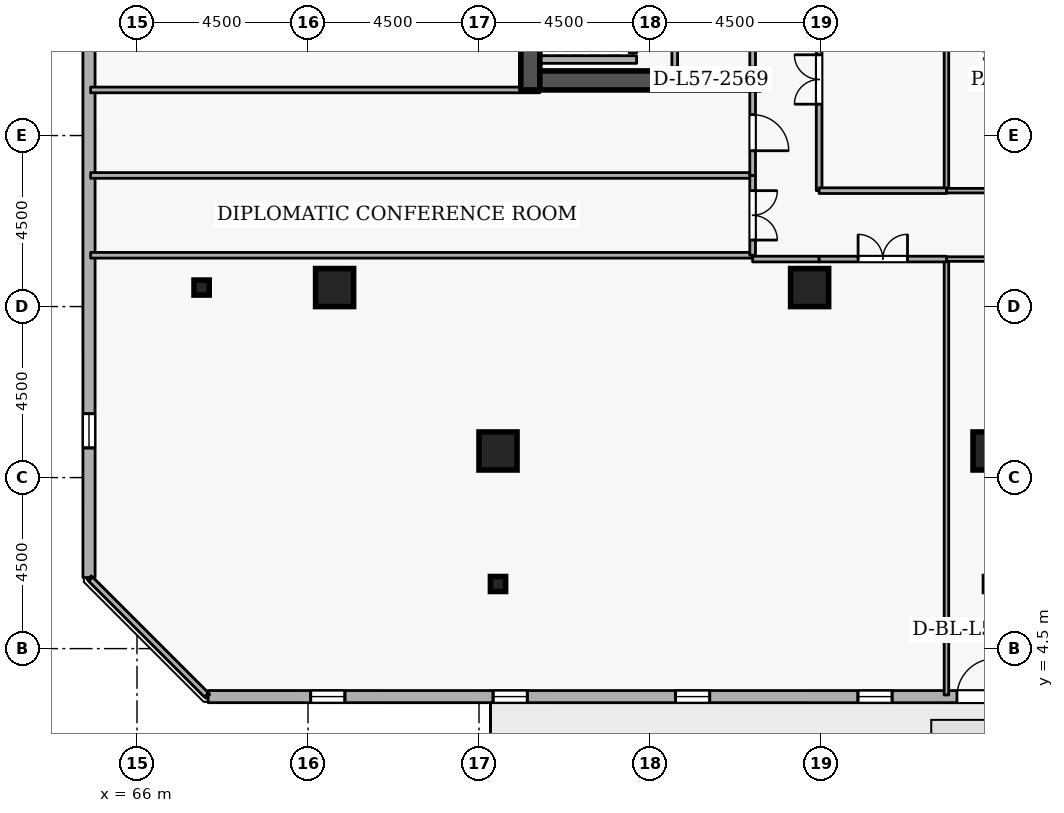
"""IFC4 building model, lengths in metres.
Left out: names, types, materials, properties, quantities, classifications, styles, units other than length and angle.
Written with IfcOpenShell. Run it as: python <this file> out.ifc"""

import sys

from ifc_helpers import new_model, si_unit, direction, frame, frame_2d, origin, origin_2d, place, context, subcontext, project, spatial, rectangle, i_section, extrude, element, fill, save


model = new_model("IFC4")
c1 = context("Model", 3, precision=1e-05, world=origin(), true_north=direction((0.0, 1.0)))
c2 = subcontext(c1, "Body", "Model", "MODEL_VIEW")
j1 = project(units=[si_unit("LENGTHUNIT", "METRE"), si_unit("PLANEANGLEUNIT", "RADIAN")], contexts=[c1])
p1 = place(None, origin())
s1 = spatial("IfcSite", under=j1, at=p1, CompositionType="ELEMENT")
p2 = place(p1, origin())
s2 = spatial("IfcBuilding", under=s1, at=p2, CompositionType="ELEMENT")
p3 = place(p2, frame((0.0, 0.0, 214.5)))
s3 = spatial("IfcBuildingStorey", under=s2, at=p3, CompositionType="ELEMENT", Elevation=214.5)
p4 = place(p3, frame((76.35, 19.2, 0.0), z_axis=(0.0, 0.0, 1.0), x_axis=(0.0, 1.0, 0.0)))
e1 = element("IfcWall", 1, at=p4, inside=s3, PredefinedType="SHEAR", context=c2, shape_type="SweptSolid", body=[
    extrude(rectangle(XDim=15.6, YDim=0.5, at=frame_2d((7.8, 0.0))), origin(), (0.0, 0.0, 1.0), 3.6),
])
p5 = place(p3, frame((76.6, 19.45, 0.0), z_axis=(0.0, 0.0, 1.0), x_axis=(1.0, 0.0, 0.0)))
e2 = element("IfcWall", 2, at=p5, inside=s3, PredefinedType="SHEAR", context=c2, shape_type="SweptSolid", body=[
    extrude(rectangle(XDim=5.8, YDim=0.5, at=frame_2d((2.9, 0.0))), origin(), (0.0, 0.0, 1.0), 3.6),
])
for number, where, z_axis, x_axis in (
    (3, (71.2, 14.0, 0.0), (0.0, 0.0, 1.0), (1.0, 0.0, 0.0)),
    (4, (88.5, 9.7, 0.0), (0.0, 0.0, 1.0), (1.0, 0.0, 0.0)),
    (5, (75.5, 9.7, 0.0), (0.0, 0.0, 1.0), (1.0, 0.0, 0.0)),
    (6, (83.7, 14.0, 0.0), (0.0, 0.0, 1.0), (1.0, 0.0, 0.0)),
):
    element("IfcColumn", number, at=place(p3, frame(where, z_axis=z_axis, x_axis=x_axis)), inside=s3, PredefinedType="COLUMN", context=c2, shape_type="SweptSolid", body=[
        extrude(rectangle(XDim=1.0, YDim=1.0, at=origin_2d()), origin(), (0.0, 0.0, 1.0), 3.6),
    ])
for number, where, z_axis, x_axis in (
    (7, (67.7, 14.0, 0.0), (0.0, 0.0, 1.0), (1.0, 0.0, 0.0)),
    (8, (75.5, 6.2, 0.0), (0.0, 0.0, 1.0), (1.0, 0.0, 0.0)),
):
    element("IfcColumn", number, at=place(p3, frame(where, z_axis=z_axis, x_axis=x_axis)), inside=s3, PredefinedType="COLUMN", context=c2, shape_type="SweptSolid", body=[
        extrude(i_section(OverallWidth=0.399, OverallDepth=0.394, WebThickness=0.023, FlangeThickness=0.037, FilletRadius=0.015, at=origin_2d()), origin(), (0.0, 0.0, 1.0), 3.6),
    ])
p6 = place(p3, frame((67.871, 3.237, 0.0), z_axis=(0.0, 0.0, 1.0), x_axis=(0.999999998513, -5.4540124e-05, 0.0)))
e9 = element("IfcWall", 9, at=p6, inside=s3, PredefinedType="STANDARD", context=c2, shape_type="SweptSolid", body=[
    extrude(rectangle(XDim=35.811, YDim=0.32, at=frame_2d((17.905, 0.0))), origin(), (0.0, 0.0, 1.0), 2.7),
])
p7 = place(p6, frame((19.706, 0.0, 0.0)))
e10 = element("IfcOpeningElement", 10, at=p7, cuts=e9, PredefinedType="OPENING", context=c2, shape_type="SweptSolid", body=[
    extrude(rectangle(XDim=1.0, YDim=2.08, at=frame_2d((0.5, 1.04))), frame((0.0, 0.17, 0.0), z_axis=(0.0, -1.0, 0.0), x_axis=(1.0, 0.0, 0.0)), (0.0, 0.0, 1.0), 0.34),
])
p8 = place(p6, frame((2.7, 0.0, 0.72)))
e11 = element("IfcOpeningElement", 11, at=p8, cuts=e9, PredefinedType="OPENING", context=c2, shape_type="SweptSolid", body=[
    extrude(rectangle(XDim=0.9, YDim=1.75, at=frame_2d((0.45, 0.875))), frame((0.0, 0.17, 0.0), z_axis=(0.0, -1.0, 0.0), x_axis=(1.0, 0.0, 0.0)), (0.0, 0.0, 1.0), 0.34),
])
p9 = place(p6, frame((7.5, 0.0, 0.72)))
e12 = element("IfcOpeningElement", 12, at=p9, cuts=e9, PredefinedType="OPENING", context=c2, shape_type="SweptSolid", body=[
    extrude(rectangle(XDim=0.9, YDim=1.75, at=frame_2d((0.45, 0.875))), frame((0.0, 0.17, 0.0), z_axis=(0.0, -1.0, 0.0), x_axis=(1.0, 0.0, 0.0)), (0.0, 0.0, 1.0), 0.34),
])
p10 = place(p6, frame((12.3, 0.0, 0.72)))
e13 = element("IfcOpeningElement", 13, at=p10, cuts=e9, PredefinedType="OPENING", context=c2, shape_type="SweptSolid", body=[
    extrude(rectangle(XDim=0.9, YDim=1.75, at=frame_2d((0.45, 0.875))), frame((0.0, 0.17, 0.0), z_axis=(0.0, -1.0, 0.0), x_axis=(1.0, 0.0, 0.0)), (0.0, 0.0, 1.0), 0.34),
])
p11 = place(p6, frame((17.1, 0.0, 0.72)))
e14 = element("IfcOpeningElement", 14, at=p11, cuts=e9, PredefinedType="OPENING", context=c2, shape_type="SweptSolid", body=[
    extrude(rectangle(XDim=0.9, YDim=1.75, at=frame_2d((0.45, 0.875))), frame((0.0, 0.17, 0.0), z_axis=(0.0, -1.0, 0.0), x_axis=(1.0, 0.0, 0.0)), (0.0, 0.0, 1.0), 0.34),
])
p12 = place(p6, frame((21.9, 0.0, 0.72)))
e15 = element("IfcOpeningElement", 15, at=p12, cuts=e9, PredefinedType="OPENING", context=c2, shape_type="SweptSolid", body=[
    extrude(rectangle(XDim=0.9, YDim=1.75, at=frame_2d((0.45, 0.875))), frame((0.0, 0.17, 0.0), z_axis=(0.0, -1.0, 0.0), x_axis=(1.0, 0.0, 0.0)), (0.0, 0.0, 1.0), 0.34),
])
p13 = place(p6, frame((26.7, 0.0, 0.72)))
e16 = element("IfcOpeningElement", 16, at=p13, cuts=e9, PredefinedType="OPENING", context=c2, shape_type="SweptSolid", body=[
    extrude(rectangle(XDim=0.9, YDim=1.75, at=frame_2d((0.45, 0.875))), frame((0.0, 0.17, 0.0), z_axis=(0.0, -1.0, 0.0), x_axis=(1.0, 0.0, 0.0)), (0.0, 0.0, 1.0), 0.34),
])
p14 = place(p6, frame((31.5, 0.0, 0.72)))
e17 = element("IfcOpeningElement", 17, at=p14, cuts=e9, PredefinedType="OPENING", context=c2, shape_type="SweptSolid", body=[
    extrude(rectangle(XDim=0.9, YDim=1.75, at=frame_2d((0.45, 0.875))), frame((0.0, 0.17, 0.0), z_axis=(0.0, -1.0, 0.0), x_axis=(1.0, 0.0, 0.0)), (0.0, 0.0, 1.0), 0.34),
])
p15 = place(p3, frame((64.735, 42.181, 0.0), z_axis=(0.0, 0.0, 1.0), x_axis=(5.4540124e-05, -0.999999998513, 0.0)))
e18 = element("IfcWall", 18, at=p15, inside=s3, PredefinedType="STANDARD", context=c2, shape_type="SweptSolid", body=[
    extrude(rectangle(XDim=35.811, YDim=0.32, at=frame_2d((17.905, 0.0))), origin(), (0.0, 0.0, 1.0), 2.7),
])
p16 = place(p15, frame((2.7, 0.0, 0.72)))
e19 = element("IfcOpeningElement", 19, at=p16, cuts=e18, PredefinedType="OPENING", context=c2, shape_type="SweptSolid", body=[
    extrude(rectangle(XDim=0.9, YDim=1.75, at=frame_2d((0.45, 0.875))), frame((0.0, 0.17, 0.0), z_axis=(0.0, -1.0, 0.0), x_axis=(1.0, 0.0, 0.0)), (0.0, 0.0, 1.0), 0.34),
])
p17 = place(p15, frame((7.5, 0.0, 0.72)))
e20 = element("IfcOpeningElement", 20, at=p17, cuts=e18, PredefinedType="OPENING", context=c2, shape_type="SweptSolid", body=[
    extrude(rectangle(XDim=0.9, YDim=1.75, at=frame_2d((0.45, 0.875))), frame((0.0, 0.17, 0.0), z_axis=(0.0, -1.0, 0.0), x_axis=(1.0, 0.0, 0.0)), (0.0, 0.0, 1.0), 0.34),
])
p18 = place(p15, frame((12.3, 0.0, 0.72)))
e21 = element("IfcOpeningElement", 21, at=p18, cuts=e18, PredefinedType="OPENING", context=c2, shape_type="SweptSolid", body=[
    extrude(rectangle(XDim=0.9, YDim=1.75, at=frame_2d((0.45, 0.875))), frame((0.0, 0.17, 0.0), z_axis=(0.0, -1.0, 0.0), x_axis=(1.0, 0.0, 0.0)), (0.0, 0.0, 1.0), 0.34),
])
p19 = place(p15, frame((17.1, 0.0, 0.72)))
e22 = element("IfcOpeningElement", 22, at=p19, cuts=e18, PredefinedType="OPENING", context=c2, shape_type="SweptSolid", body=[
    extrude(rectangle(XDim=0.9, YDim=1.75, at=frame_2d((0.45, 0.875))), frame((0.0, 0.17, 0.0), z_axis=(0.0, -1.0, 0.0), x_axis=(1.0, 0.0, 0.0)), (0.0, 0.0, 1.0), 0.34),
])
p20 = place(p15, frame((31.5, 0.0, 0.72)))
e23 = element("IfcOpeningElement", 23, at=p20, cuts=e18, PredefinedType="OPENING", context=c2, shape_type="SweptSolid", body=[
    extrude(rectangle(XDim=0.9, YDim=1.75, at=frame_2d((0.45, 0.875))), frame((0.0, 0.17, 0.0), z_axis=(0.0, -1.0, 0.0), x_axis=(1.0, 0.0, 0.0)), (0.0, 0.0, 1.0), 0.34),
])
p21 = place(p3, frame((79.05, 20.18, 0.0), z_axis=(0.0, 0.0, 1.0), x_axis=(0.0, 1.0, 0.0)))
e24 = element("IfcWall", 24, at=p21, inside=s3, PredefinedType="STANDARD", context=c2, shape_type="SweptSolid", body=[
    extrude(rectangle(XDim=1.94, YDim=0.2, at=frame_2d((0.97, 0.0))), origin(), (0.0, 0.0, 1.0), 3.34),
])
p22 = place(p21, frame((0.46, 0.0, 0.0)))
e25 = element("IfcOpeningElement", 25, at=p22, cuts=e24, PredefinedType="OPENING", context=c2, shape_type="SweptSolid", body=[
    extrude(rectangle(XDim=1.02, YDim=2.06, at=frame_2d((0.51, 1.03))), frame((0.0, 0.11, 0.0), z_axis=(0.0, -1.0, 0.0), x_axis=(1.0, 0.0, 0.0)), (0.0, 0.0, 1.0), 0.22),
])
p23 = place(p3, frame((76.612, 20.0, 0.0), z_axis=(0.0, 0.0, 1.0), x_axis=(1.0, 0.0, 0.0)))
e26 = element("IfcWall", 26, at=p23, inside=s3, PredefinedType="STANDARD", context=c2, shape_type="SweptSolid", body=[
    extrude(rectangle(XDim=2.536, YDim=0.2, at=frame_2d((1.268, 0.0))), origin(), (0.0, 0.0, 1.0), 3.34),
])
p24 = place(p3, frame((82.2, 19.8, 0.0), z_axis=(0.0, 0.0, 1.0), x_axis=(0.0, 1.0, 0.0)))
e27 = element("IfcWall", 27, at=p24, inside=s3, PredefinedType="PARTITIONING", context=c2, shape_type="SweptSolid", body=[
    extrude(rectangle(XDim=2.25, YDim=0.15, at=frame_2d((1.125, 0.0))), origin(), (0.0, 0.0, 1.0), 3.34),
])
p25 = place(p24, frame((0.665, 0.0, 0.0)))
e28 = element("IfcOpeningElement", 28, at=p25, cuts=e27, PredefinedType="OPENING", context=c2, shape_type="SweptSolid", body=[
    extrude(rectangle(XDim=0.92, YDim=2.08, at=frame_2d((0.46, 1.04))), frame((0.0, 0.085, 0.0), z_axis=(0.0, -1.0, 0.0), x_axis=(1.0, 0.0, 0.0)), (0.0, 0.0, 1.0), 0.17),
])
p26 = place(p3, frame((80.15, 22.05, 0.0), z_axis=(0.0, 0.0, 1.0), x_axis=(0.0, -1.0, 0.0)))
e29 = element("IfcWall", 29, at=p26, inside=s3, PredefinedType="PARTITIONING", context=c2, shape_type="SweptSolid", body=[
    extrude(rectangle(XDim=2.25, YDim=0.15, at=frame_2d((1.125, 0.0))), origin(), (0.0, 0.0, 1.0), 3.34),
])
for number, where, z_axis, x_axis in (
    (30, (82.2, 14.85, 0.0), (0.0, 0.0, 1.0), (-1.0, 0.0, 0.0)),
    (31, (64.78, 16.95, 0.0), (0.0, 0.0, 1.0), (1.0, 0.0, 0.0)),
):
    element("IfcWall", number, at=place(p3, frame(where, z_axis=z_axis, x_axis=x_axis)), inside=s3, PredefinedType="PARTITIONING", context=c2, shape_type="SweptSolid", body=[
        extrude(rectangle(XDim=17.42, YDim=0.15, at=frame_2d((8.71, 0.0))), origin(), (0.0, 0.0, 1.0), 3.34),
    ])
p27 = place(p3, frame((82.2, 16.95, 0.0), z_axis=(0.0, 0.0, 1.0), x_axis=(0.0, -1.0, 0.0)))
e32 = element("IfcWall", 32, at=p27, inside=s3, PredefinedType="PARTITIONING", context=c2, shape_type="SweptSolid", body=[
    extrude(rectangle(XDim=2.1, YDim=0.15, at=frame_2d((1.05, 0.0))), origin(), (0.0, 0.0, 1.0), 3.34),
])
p28 = place(p27, frame((0.4, 0.0, 0.0)))
e33 = element("IfcOpeningElement", 33, at=p28, cuts=e32, PredefinedType="OPENING", context=c2, shape_type="SweptSolid", body=[
    extrude(rectangle(XDim=1.3, YDim=2.12, at=frame_2d((0.65, 1.06))), frame((0.0, 0.085, 0.0), z_axis=(0.0, -1.0, 0.0), x_axis=(1.0, 0.0, 0.0)), (0.0, 0.0, 1.0), 0.17),
])
p29 = place(p3, frame((64.78, 19.2, 0.0), z_axis=(0.0, 0.0, 1.0), x_axis=(1.0, 0.0, 0.0)))
e34 = element("IfcWall", 34, at=p29, inside=s3, PredefinedType="PARTITIONING", context=c2, shape_type="SweptSolid", body=[
    extrude(rectangle(XDim=11.82, YDim=0.15, at=frame_2d((5.91, 0.0))), origin(), (0.0, 0.0, 1.0), 2.545),
])
p30 = place(p3, frame((82.2, 19.2, 0.0), z_axis=(0.0, 0.0, 1.0), x_axis=(0.0, -1.0, 0.0)))
e35 = element("IfcWall", 35, at=p30, inside=s3, PredefinedType="PARTITIONING", context=c2, shape_type="SweptSolid", body=[
    extrude(rectangle(XDim=2.25, YDim=0.15, at=frame_2d((1.125, 0.0))), origin(), (0.0, 0.0, 1.0), 3.34),
])
p31 = place(p30, frame((0.65, 0.0, 0.0)))
e36 = element("IfcOpeningElement", 36, at=p31, cuts=e35, PredefinedType="OPENING", context=c2, shape_type="SweptSolid", body=[
    extrude(rectangle(XDim=0.95, YDim=2.1, at=frame_2d((0.475, 1.05))), frame((0.0, 0.085, 0.0), z_axis=(0.0, -1.0, 0.0), x_axis=(1.0, 0.0, 0.0)), (0.0, 0.0, 1.0), 0.17),
])
p32 = place(p3, frame((87.3, 3.28, 0.0), z_axis=(0.0, 0.0, 1.0), x_axis=(0.0, 1.0, 0.0)))
e37 = element("IfcWall", 37, at=p32, inside=s3, PredefinedType="PARTITIONING", context=c2, shape_type="SweptSolid", body=[
    extrude(rectangle(XDim=11.47, YDim=0.12, at=frame_2d((5.735, 0.0))), origin(), (0.0, 0.0, 1.0), 3.34),
])
p33 = place(p3, frame((87.3, 14.75, 0.0), z_axis=(0.0, 0.0, 1.0), x_axis=(1.0, 0.0, 0.0)))
e38 = element("IfcWall", 38, at=p33, inside=s3, PredefinedType="PARTITIONING", context=c2, shape_type="SweptSolid", body=[
    extrude(rectangle(XDim=5.75, YDim=0.12, at=frame_2d((2.875, 0.0))), origin(), (0.0, 0.0, 1.0), 3.34),
])
p34 = place(p33, frame((2.35, 0.0, 0.0)))
e39 = element("IfcOpeningElement", 39, at=p34, cuts=e38, PredefinedType="OPENING", context=c2, shape_type="SweptSolid", body=[
    extrude(rectangle(XDim=1.05, YDim=2.1, at=frame_2d((0.525, 1.05))), frame((0.0, 0.07, 0.0), z_axis=(0.0, -1.0, 0.0), x_axis=(1.0, 0.0, 0.0)), (0.0, 0.0, 1.0), 0.14),
])
p35 = place(p3, frame((67.829, 3.28, 0.0), z_axis=(0.0, 0.0, 1.0), x_axis=(-0.707106781187, 0.707106781187, 0.0)))
e40 = element("IfcWall", 40, at=p35, inside=s3, PredefinedType="PARTITIONING", context=c2, shape_type="SweptSolid", body=[
    extrude(rectangle(XDim=4.311, YDim=0.15, at=frame_2d((2.156, 0.0))), origin(), (0.0, 0.0, 1.0), 3.34),
])
p36 = place(p3, frame((82.2, 14.75, 0.0), z_axis=(0.0, 0.0, 1.0), x_axis=(1.0, 0.0, 0.0)))
e41 = element("IfcWall", 41, at=p36, inside=s3, PredefinedType="PARTITIONING", context=c2, shape_type="SweptSolid", body=[
    extrude(rectangle(XDim=1.75, YDim=0.15, at=frame_2d((0.875, 0.0))), origin(), (0.0, 0.0, 1.0), 3.34),
])
p37 = place(p3, frame((83.95, 14.75, 0.0), z_axis=(0.0, 0.0, 1.0), x_axis=(1.0, 0.0, 0.0)))
e42 = element("IfcWall", 42, at=p37, inside=s3, PredefinedType="PARTITIONING", context=c2, shape_type="SweptSolid", body=[
    extrude(rectangle(XDim=3.35, YDim=0.15, at=frame_2d((1.675, 0.0))), origin(), (0.0, 0.0, 1.0), 3.34),
])
p38 = place(p37, frame((1.025, 0.0, 0.0)))
e43 = element("IfcOpeningElement", 43, at=p38, cuts=e42, PredefinedType="OPENING", context=c2, shape_type="SweptSolid", body=[
    extrude(rectangle(XDim=1.3, YDim=2.12, at=frame_2d((0.65, 1.06))), frame((0.0, 0.085, 0.0), z_axis=(0.0, -1.0, 0.0), x_axis=(1.0, 0.0, 0.0)), (0.0, 0.0, 1.0), 0.17),
])
p39 = place(p3, frame((87.3, 16.55, 0.0), z_axis=(0.0, 0.0, 1.0), x_axis=(0.0, 1.0, 0.0)))
e44 = element("IfcWall", 44, at=p39, inside=s3, PredefinedType="PARTITIONING", context=c2, shape_type="SweptSolid", body=[
    extrude(rectangle(XDim=5.85, YDim=0.12, at=frame_2d((2.925, 0.0))), origin(), (0.0, 0.0, 1.0), 3.34),
])
p40 = place(p3, frame((93.05, 16.55, 0.0), z_axis=(0.0, 0.0, 1.0), x_axis=(-1.0, 0.0, 0.0)))
e45 = element("IfcWall", 45, at=p40, inside=s3, PredefinedType="PARTITIONING", context=c2, shape_type="SweptSolid", body=[
    extrude(rectangle(XDim=5.75, YDim=0.12, at=frame_2d((2.875, 0.0))), origin(), (0.0, 0.0, 1.0), 3.34),
])
p41 = place(p3, frame((83.95, 16.55, 0.0), z_axis=(0.0, 0.0, 1.0), x_axis=(0.0, 1.0, 0.0)))
e46 = element("IfcWall", 46, at=p41, inside=s3, PredefinedType="PARTITIONING", context=c2, shape_type="SweptSolid", body=[
    extrude(rectangle(XDim=5.85, YDim=0.15, at=frame_2d((2.925, 0.0))), origin(), (0.0, 0.0, 1.0), 3.34),
])
p42 = place(p41, frame((2.275, 0.0, 0.0)))
e47 = element("IfcOpeningElement", 47, at=p42, cuts=e46, PredefinedType="OPENING", context=c2, shape_type="SweptSolid", body=[
    extrude(rectangle(XDim=1.3, YDim=2.12, at=frame_2d((0.65, 1.06))), frame((0.0, 0.085, 0.0), z_axis=(0.0, -1.0, 0.0), x_axis=(1.0, 0.0, 0.0)), (0.0, 0.0, 1.0), 0.17),
])
p43 = place(p3, frame((87.3, 16.55, 0.0), z_axis=(0.0, 0.0, 1.0), x_axis=(-1.0, 0.0, 0.0)))
e48 = element("IfcWall", 48, at=p43, inside=s3, PredefinedType="PARTITIONING", context=c2, shape_type="SweptSolid", body=[
    extrude(rectangle(XDim=3.35, YDim=0.15, at=frame_2d((1.675, 0.0))), origin(), (0.0, 0.0, 1.0), 3.34),
])
p44 = place(p7, origin())
e49 = element("IfcDoor", 49, at=p44, inside=s3, OperationType="SINGLE_SWING_RIGHT", PredefinedType="DOOR", context=c2, shape_type="SweptSolid", body=[
    extrude(rectangle(XDim=1.0, YDim=2.08, at=frame_2d((0.5, 1.04))), frame((0.0, 0.025, 0.0), z_axis=(0.0, -1.0, 0.0), x_axis=(1.0, 0.0, 0.0)), (0.0, 0.0, 1.0), 0.05),
])
fill(e10, e49)
p45 = place(p8, origin())
e50 = element("IfcWindow", 50, at=p45, inside=s3, PartitioningType="SINGLE_PANEL", PredefinedType="WINDOW", context=c2, shape_type="SweptSolid", body=[
    extrude(rectangle(XDim=0.9, YDim=1.75, at=frame_2d((0.45, 0.875))), frame((0.0, 0.03, 0.0), z_axis=(0.0, -1.0, 0.0), x_axis=(1.0, 0.0, 0.0)), (0.0, 0.0, 1.0), 0.06),
])
fill(e11, e50)
p46 = place(p9, origin())
e51 = element("IfcWindow", 51, at=p46, inside=s3, PartitioningType="SINGLE_PANEL", PredefinedType="WINDOW", context=c2, shape_type="SweptSolid", body=[
    extrude(rectangle(XDim=0.9, YDim=1.75, at=frame_2d((0.45, 0.875))), frame((0.0, 0.03, 0.0), z_axis=(0.0, -1.0, 0.0), x_axis=(1.0, 0.0, 0.0)), (0.0, 0.0, 1.0), 0.06),
])
fill(e12, e51)
p47 = place(p10, origin())
e52 = element("IfcWindow", 52, at=p47, inside=s3, PartitioningType="SINGLE_PANEL", PredefinedType="WINDOW", context=c2, shape_type="SweptSolid", body=[
    extrude(rectangle(XDim=0.9, YDim=1.75, at=frame_2d((0.45, 0.875))), frame((0.0, 0.03, 0.0), z_axis=(0.0, -1.0, 0.0), x_axis=(1.0, 0.0, 0.0)), (0.0, 0.0, 1.0), 0.06),
])
fill(e13, e52)
p48 = place(p11, origin())
e53 = element("IfcWindow", 53, at=p48, inside=s3, PartitioningType="SINGLE_PANEL", PredefinedType="WINDOW", context=c2, shape_type="SweptSolid", body=[
    extrude(rectangle(XDim=0.9, YDim=1.75, at=frame_2d((0.45, 0.875))), frame((0.0, 0.03, 0.0), z_axis=(0.0, -1.0, 0.0), x_axis=(1.0, 0.0, 0.0)), (0.0, 0.0, 1.0), 0.06),
])
fill(e14, e53)
p49 = place(p20, origin())
e54 = element("IfcWindow", 54, at=p49, inside=s3, PartitioningType="SINGLE_PANEL", PredefinedType="WINDOW", context=c2, shape_type="SweptSolid", body=[
    extrude(rectangle(XDim=0.9, YDim=1.75, at=frame_2d((0.45, 0.875))), frame((0.0, 0.03, 0.0), z_axis=(0.0, -1.0, 0.0), x_axis=(1.0, 0.0, 0.0)), (0.0, 0.0, 1.0), 0.06),
])
fill(e23, e54)
p50 = place(p28, origin())
e55 = element("IfcDoor", 55, at=p50, inside=s3, OperationType="DOUBLE_DOOR_SINGLE_SWING", PredefinedType="DOOR", context=c2, shape_type="SweptSolid", body=[
    extrude(rectangle(XDim=1.3, YDim=2.12, at=frame_2d((0.65, 1.06))), frame((0.0, 0.025, 0.0), z_axis=(0.0, -1.0, 0.0), x_axis=(1.0, 0.0, 0.0)), (0.0, 0.0, 1.0), 0.05),
])
fill(e33, e55)
p51 = place(p31, origin())
e56 = element("IfcDoor", 56, at=p51, inside=s3, OperationType="SINGLE_SWING_RIGHT", PredefinedType="DOOR", context=c2, shape_type="SweptSolid", body=[
    extrude(rectangle(XDim=0.95, YDim=2.1, at=frame_2d((0.475, 1.05))), frame((0.0, 0.025, 0.0), z_axis=(0.0, -1.0, 0.0), x_axis=(1.0, 0.0, 0.0)), (0.0, 0.0, 1.0), 0.05),
])
fill(e36, e56)
p52 = place(p38, origin())
e57 = element("IfcDoor", 57, at=p52, inside=s3, OperationType="DOUBLE_DOOR_SINGLE_SWING", PredefinedType="DOOR", context=c2, shape_type="SweptSolid", body=[
    extrude(rectangle(XDim=1.3, YDim=2.12, at=frame_2d((0.65, 1.06))), frame((0.0, 0.025, 0.0), z_axis=(0.0, -1.0, 0.0), x_axis=(1.0, 0.0, 0.0)), (0.0, 0.0, 1.0), 0.05),
])
fill(e43, e57)
p53 = place(p42, origin())
e58 = element("IfcDoor", 58, at=p53, inside=s3, OperationType="DOUBLE_DOOR_SINGLE_SWING", PredefinedType="DOOR", context=c2, shape_type="SweptSolid", body=[
    extrude(rectangle(XDim=1.3, YDim=2.12, at=frame_2d((0.65, 1.06))), frame((0.0, 0.025, 0.0), z_axis=(0.0, -1.0, 0.0), x_axis=(1.0, 0.0, 0.0)), (0.0, 0.0, 1.0), 0.05),
])
fill(e47, e58)
save(model, sys.argv[1])
